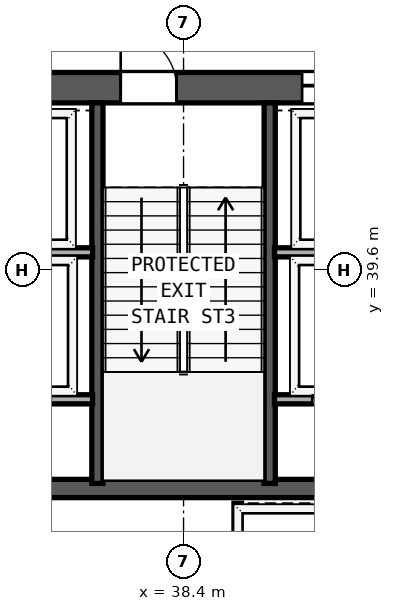
"""IFC4 building model, lengths in metres.
Left out: names, types, materials, properties, quantities, classifications, styles, units other than length and angle.
Written with IfcOpenShell. Run it as: python <this file> out.ifc"""

import sys

from ifc_helpers import new_model, si_unit, direction, frame, frame_2d, origin, place, context, subcontext, project, spatial, rectangle, extrude, element, fill, save


model = new_model("IFC4")
c1 = context("Model", 3, precision=1e-05, world=origin(), true_north=direction((0.0, 1.0)))
c2 = subcontext(c1, "Body", "Model", "MODEL_VIEW")
j1 = project(units=[si_unit("LENGTHUNIT", "METRE"), si_unit("PLANEANGLEUNIT", "RADIAN")], contexts=[c1])
p1 = place(None, origin())
s1 = spatial("IfcSite", under=j1, at=p1, CompositionType="ELEMENT")
p2 = place(p1, origin())
s2 = spatial("IfcBuilding", under=s1, at=p2, CompositionType="ELEMENT")
p3 = place(p2, frame((0.0, 0.0, 230.6)))
s3 = spatial("IfcBuildingStorey", under=s2, at=p3, CompositionType="ELEMENT", Elevation=230.6)
p4 = place(p3, frame((29.7, 43.2, 0.0), z_axis=(0.0, 0.0, 1.0), x_axis=(1.0, 0.0, 0.0)))
e1 = element("IfcWall", 1, at=p4, inside=s3, PredefinedType="SHEAR", context=c2, shape_type="SweptSolid", body=[
    extrude(rectangle(XDim=17.4, YDim=0.6, at=frame_2d((8.7, 0.0))), origin(), (0.0, 0.0, 1.0), 4.35),
])
p5 = place(p4, frame((2.35, 0.0, 0.0)))
e2 = element("IfcOpeningElement", 2, at=p5, cuts=e1, PredefinedType="OPENING", context=c2, shape_type="SweptSolid", body=[
    extrude(rectangle(XDim=1.1, YDim=2.15, at=frame_2d((0.55, 1.075))), frame((0.0, 0.31, 0.0), z_axis=(0.0, -1.0, 0.0), x_axis=(1.0, 0.0, 0.0)), (0.0, 0.0, 1.0), 0.62),
])
p6 = place(p4, frame((7.46, 0.0, 0.0)))
e3 = element("IfcOpeningElement", 3, at=p6, cuts=e1, PredefinedType="OPENING", context=c2, shape_type="SweptSolid", body=[
    extrude(rectangle(XDim=1.1, YDim=2.15, at=frame_2d((0.55, 1.075))), frame((0.0, 0.31, 0.0), z_axis=(0.0, -1.0, 0.0), x_axis=(1.0, 0.0, 0.0)), (0.0, 0.0, 1.0), 0.62),
])
p7 = place(p4, frame((13.55, 0.0, 0.0)))
e4 = element("IfcOpeningElement", 4, at=p7, cuts=e1, PredefinedType="OPENING", context=c2, shape_type="SweptSolid", body=[
    extrude(rectangle(XDim=1.1, YDim=2.15, at=frame_2d((0.55, 1.075))), frame((0.0, 0.31, 0.0), z_axis=(0.0, -1.0, 0.0), x_axis=(1.0, 0.0, 0.0)), (0.0, 0.0, 1.0), 0.62),
])
p8 = place(p4, frame((4.68, 0.0, 0.0)))
e5 = element("IfcOpeningElement", 5, at=p8, cuts=e1, PredefinedType="OPENING", context=c2, shape_type="SweptSolid", body=[
    extrude(rectangle(XDim=1.1, YDim=2.2, at=frame_2d((0.55, 1.1))), frame((0.0, 0.31, 0.0), z_axis=(0.0, -1.0, 0.0), x_axis=(1.0, 0.0, 0.0)), (0.0, 0.0, 1.0), 0.62),
])
p9 = place(p4, frame((11.04, 0.0, 0.0)))
e6 = element("IfcOpeningElement", 6, at=p9, cuts=e1, PredefinedType="OPENING", context=c2, shape_type="SweptSolid", body=[
    extrude(rectangle(XDim=1.1, YDim=2.2, at=frame_2d((0.55, 1.1))), frame((0.0, 0.31, 0.0), z_axis=(0.0, -1.0, 0.0), x_axis=(1.0, 0.0, 0.0)), (0.0, 0.0, 1.0), 0.62),
])
p10 = place(p3, frame((30.3, 35.29, 0.0), z_axis=(0.0, 0.0, 1.0), x_axis=(1.0, 0.0, 0.0)))
e7 = element("IfcWall", 7, at=p10, inside=s3, PredefinedType="SHEAR", context=c2, shape_type="SweptSolid", body=[
    extrude(rectangle(XDim=16.2, YDim=0.36, at=frame_2d((8.1, 0.0))), origin(), (0.0, 0.0, 1.0), 4.35),
])
p11 = place(p10, frame((5.05, 0.0, 0.0), z_axis=(0.0, 0.0, 1.0), x_axis=(-1.0, 0.0, 0.0)))
e8 = element("IfcOpeningElement", 8, at=p11, cuts=e7, PredefinedType="OPENING", context=c2, shape_type="SweptSolid", body=[
    extrude(rectangle(XDim=0.9, YDim=2.1, at=frame_2d((0.45, 1.05))), frame((0.0, 0.19, 0.0), z_axis=(0.0, -1.0, 0.0), x_axis=(1.0, 0.0, 0.0)), (0.0, 0.0, 1.0), 0.38),
])
p12 = place(p10, frame((12.11, 0.0, 0.0), z_axis=(0.0, 0.0, 1.0), x_axis=(-1.0, 0.0, 0.0)))
e9 = element("IfcOpeningElement", 9, at=p12, cuts=e7, PredefinedType="OPENING", context=c2, shape_type="SweptSolid", body=[
    extrude(rectangle(XDim=0.9, YDim=2.1, at=frame_2d((0.45, 1.05))), frame((0.0, 0.19, 0.0), z_axis=(0.0, -1.0, 0.0), x_axis=(1.0, 0.0, 0.0)), (0.0, 0.0, 1.0), 0.38),
])
for number, where, z_axis, x_axis in (
    (10, (36.7, 35.39, 0.0), (0.0, 0.0, 1.0), (0.0, 1.0, 0.0)),
    (11, (40.1, 35.39, 0.0), (0.0, 0.0, 1.0), (0.0, 1.0, 0.0)),
):
    element("IfcWall", number, at=place(p3, frame(where, z_axis=z_axis, x_axis=x_axis)), inside=s3, PredefinedType="SHEAR", context=c2, shape_type="SweptSolid", body=[
        extrude(rectangle(XDim=7.51, YDim=0.22, at=frame_2d((3.755, 0.0))), origin(), (0.0, 0.0, 1.0), 4.35),
    ])
for number, where, z_axis, x_axis in (
    (12, (33.835, 39.95, 0.0), (0.0, 0.0, 1.0), (1.0, 0.0, 0.0)),
    (13, (40.195, 39.95, 0.0), (0.0, 0.0, 1.0), (1.0, 0.0, 0.0)),
):
    element("IfcWall", number, at=place(p3, frame(where, z_axis=z_axis, x_axis=x_axis)), inside=s3, PredefinedType="SOLIDWALL", context=c2, shape_type="SweptSolid", body=[
        extrude(rectangle(XDim=2.77, YDim=0.18, at=frame_2d((1.385, 0.0))), origin(), (0.0, 0.0, 1.0), 4.35),
    ])
p13 = place(p3, frame((33.835, 37.05, 0.0), z_axis=(0.0, 0.0, 1.0), x_axis=(1.0, 0.0, 0.0)))
e14 = element("IfcWall", 14, at=p13, inside=s3, PredefinedType="SOLIDWALL", context=c2, shape_type="SweptSolid", body=[
    extrude(rectangle(XDim=2.77, YDim=0.18, at=frame_2d((1.385, 0.0))), origin(), (0.0, 0.0, 1.0), 4.35),
])
p14 = place(p13, frame((1.945, 0.0, 0.0), z_axis=(0.0, 0.0, 1.0), x_axis=(-1.0, 0.0, 0.0)))
e15 = element("IfcOpeningElement", 15, at=p14, cuts=e14, PredefinedType="OPENING", context=c2, shape_type="SweptSolid", body=[
    extrude(rectangle(XDim=1.2, YDim=2.2, at=frame_2d((0.6, 1.1))), frame((0.0, 0.1, 0.0), z_axis=(0.0, -1.0, 0.0), x_axis=(1.0, 0.0, 0.0)), (0.0, 0.0, 1.0), 0.2),
])
p15 = place(p3, frame((40.195, 37.05, 0.0), z_axis=(0.0, 0.0, 1.0), x_axis=(1.0, 0.0, 0.0)))
e16 = element("IfcWall", 16, at=p15, inside=s3, PredefinedType="SOLIDWALL", context=c2, shape_type="SweptSolid", body=[
    extrude(rectangle(XDim=2.77, YDim=0.18, at=frame_2d((1.385, 0.0))), origin(), (0.0, 0.0, 1.0), 4.35),
])
p16 = place(p15, frame((1.945, 0.0, 0.0), z_axis=(0.0, 0.0, 1.0), x_axis=(-1.0, 0.0, 0.0)))
e17 = element("IfcOpeningElement", 17, at=p16, cuts=e16, PredefinedType="OPENING", context=c2, shape_type="SweptSolid", body=[
    extrude(rectangle(XDim=1.2, YDim=2.2, at=frame_2d((0.6, 1.1))), frame((0.0, 0.1, 0.0), z_axis=(0.0, -1.0, 0.0), x_axis=(1.0, 0.0, 0.0)), (0.0, 0.0, 1.0), 0.2),
])
p17 = place(p3, frame((39.47, 32.95, 0.0), z_axis=(0.0, 0.0, 1.0), x_axis=(0.0, 1.0, 0.0)))
e18 = element("IfcWall", 18, at=p17, inside=s3, PredefinedType="SOLIDWALL", context=c2, shape_type="SweptSolid", body=[
    extrude(rectangle(XDim=2.05, YDim=0.15, at=frame_2d((1.025, 0.0))), origin(), (0.0, 0.0, 1.0), 4.35),
])
p18 = place(p6, origin())
e19 = element("IfcDoor", 19, at=p18, inside=s3, OperationType="SINGLE_SWING_LEFT", PredefinedType="DOOR", context=c2, shape_type="SweptSolid", body=[
    extrude(rectangle(XDim=1.1, YDim=2.15, at=frame_2d((0.55, 1.075))), frame((0.0, 0.185, 0.0), z_axis=(0.0, -1.0, 0.0), x_axis=(1.0, 0.0, 0.0)), (0.0, 0.0, 1.0), 0.05),
])
fill(e3, e19)
p19 = place(p9, origin())
e20 = element("IfcDoor", 20, at=p19, inside=s3, OperationType="SLIDING_TO_LEFT", PredefinedType="DOOR", context=c2, shape_type="SweptSolid", body=[
    extrude(rectangle(XDim=1.1, YDim=2.2, at=frame_2d((0.55, 1.1))), frame((0.0, 0.185, 0.0), z_axis=(0.0, -1.0, 0.0), x_axis=(1.0, 0.0, 0.0)), (0.0, 0.0, 1.0), 0.05),
])
fill(e6, e20)
p20 = place(p16, origin())
e21 = element("IfcDoor", 21, at=p20, inside=s3, OperationType="SLIDING_TO_RIGHT", PredefinedType="DOOR", context=c2, shape_type="SweptSolid", body=[
    extrude(rectangle(XDim=1.2, YDim=2.2, at=frame_2d((0.6, 1.1))), frame((0.0, 0.025, 0.0), z_axis=(0.0, -1.0, 0.0), x_axis=(1.0, 0.0, 0.0)), (0.0, 0.0, 1.0), 0.05),
])
fill(e17, e21)
save(model, sys.argv[1])
